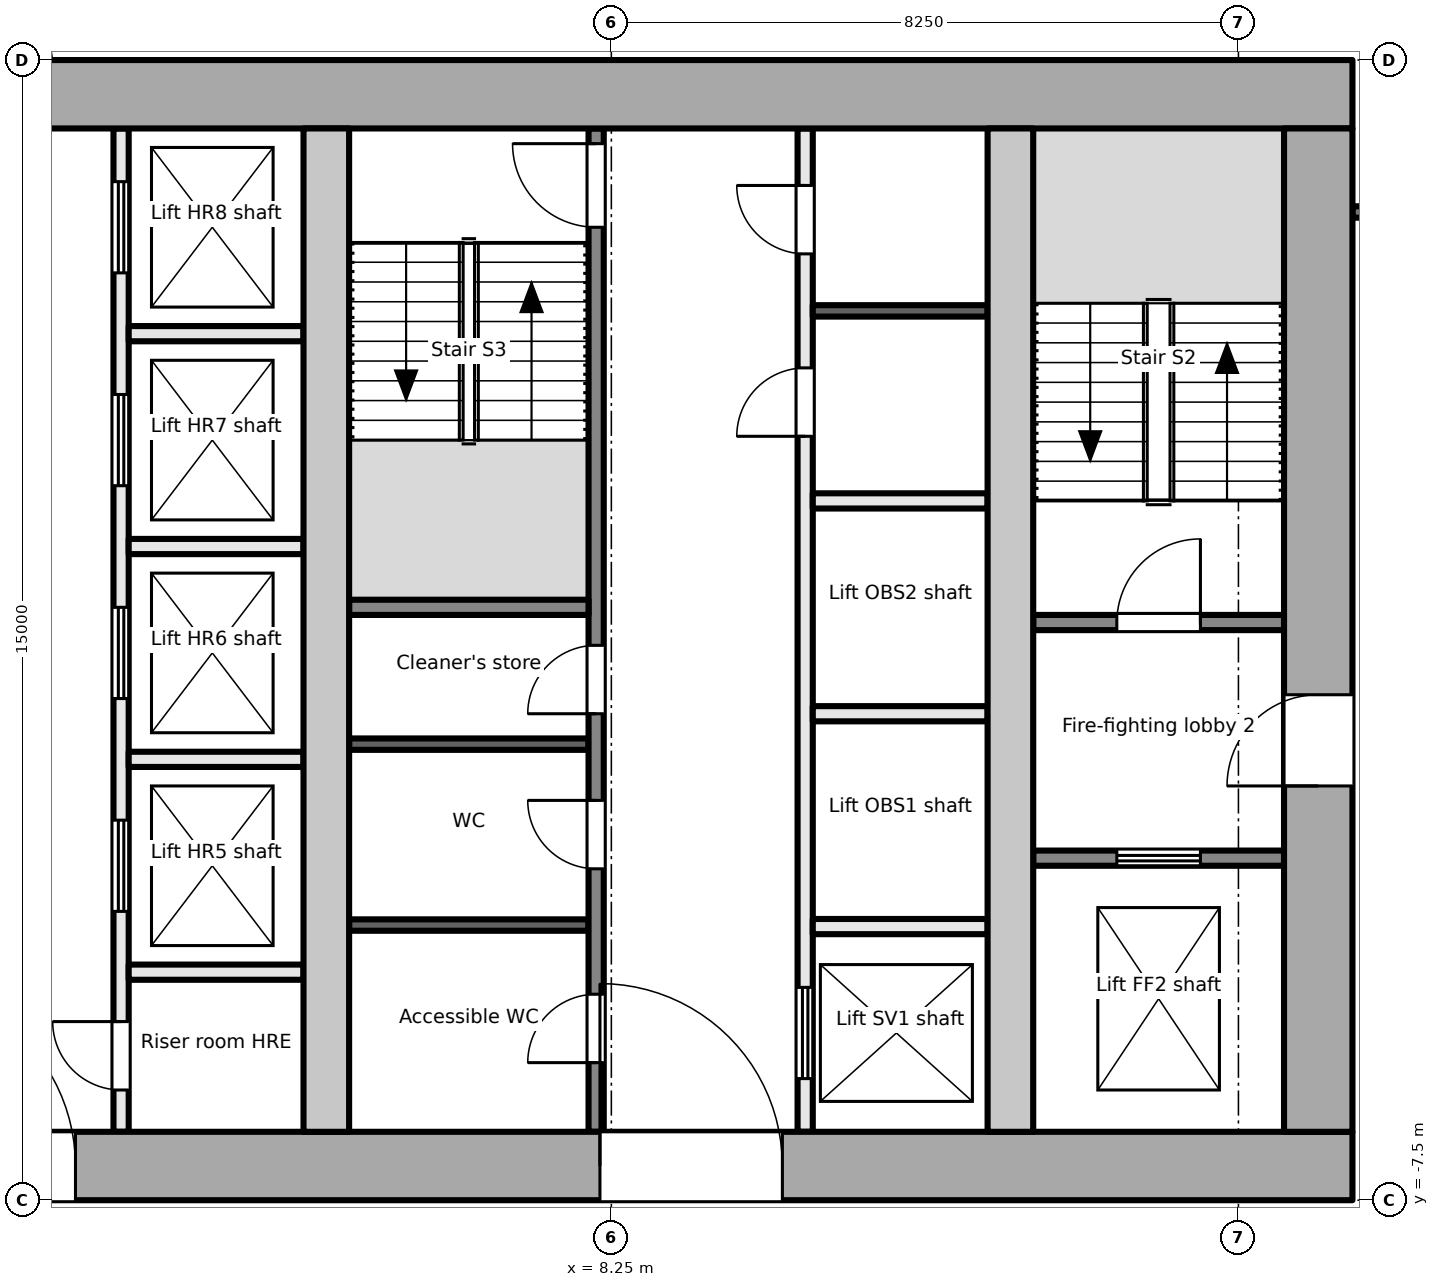
"""IFC4 building model, lengths in metres.
Left out: names, types, materials, properties, quantities, classifications, styles, units other than length and angle.
Written with IfcOpenShell. Run it as: python <this file> out.ifc"""

import sys

from ifc_helpers import new_model, si_unit, direction, frame, frame_2d, origin, place, context, subcontext, project, spatial, rectangle, extrude, element, fill, save


model = new_model("IFC4")
c1 = context("Model", 3, precision=1e-05, world=origin(), true_north=direction((0.0, 1.0)))
c2 = subcontext(c1, "Body", "Model", "MODEL_VIEW")
j1 = project(units=[si_unit("LENGTHUNIT", "METRE"), si_unit("PLANEANGLEUNIT", "RADIAN")], contexts=[c1])
p1 = place(None, origin())
s1 = spatial("IfcSite", under=j1, at=p1, CompositionType="ELEMENT")
p2 = place(p1, origin())
s2 = spatial("IfcBuilding", under=s1, at=p2, CompositionType="ELEMENT")
p3 = place(p2, frame((0.0, 0.0, 172.4)))
s3 = spatial("IfcBuildingStorey", under=s2, at=p3, CompositionType="ELEMENT", Elevation=172.4)
p4 = place(p3, frame((-18.0, -7.05, -0.2), z_axis=(0.0, 0.0, 1.0), x_axis=(1.0, 0.0, 0.0)))
e1 = element("IfcWall", 1, at=p4, inside=s3, PredefinedType="SHEAR", context=c2, shape_type="SweptSolid", body=[
    extrude(rectangle(XDim=36.0, YDim=0.9, at=frame_2d((18.0, 0.0))), origin(), (0.0, 0.0, 1.0), 3.9),
])
p5 = place(p4, frame((8.1, 0.0, 0.2)))
e2 = element("IfcOpeningElement", 2, at=p5, cuts=e1, PredefinedType="OPENING", context=c2, shape_type="SweptSolid", body=[
    extrude(rectangle(XDim=1.8, YDim=2.1, at=frame_2d((0.9, 1.05))), frame((0.0, 0.46, 0.0), z_axis=(0.0, -1.0, 0.0), x_axis=(1.0, 0.0, 0.0)), (0.0, 0.0, 1.0), 0.921),
])
p6 = place(p4, frame((16.8, 0.0, 0.2)))
e3 = element("IfcOpeningElement", 3, at=p6, cuts=e1, PredefinedType="OPENING", context=c2, shape_type="SweptSolid", body=[
    extrude(rectangle(XDim=2.4, YDim=2.1, at=frame_2d((1.2, 1.05))), frame((0.0, 0.46, 0.0), z_axis=(0.0, -1.0, 0.0), x_axis=(1.0, 0.0, 0.0)), (0.0, 0.0, 1.0), 0.921),
])
p7 = place(p4, frame((26.1, 0.0, 0.2)))
e4 = element("IfcOpeningElement", 4, at=p7, cuts=e1, PredefinedType="OPENING", context=c2, shape_type="SweptSolid", body=[
    extrude(rectangle(XDim=2.4, YDim=2.1, at=frame_2d((1.2, 1.05))), frame((0.0, 0.46, 0.0), z_axis=(0.0, -1.0, 0.0), x_axis=(1.0, 0.0, 0.0)), (0.0, 0.0, 1.0), 0.921),
])
p8 = place(p3, frame((-18.0, 7.05, -0.2), z_axis=(0.0, 0.0, 1.0), x_axis=(1.0, 0.0, 0.0)))
e5 = element("IfcWall", 5, at=p8, inside=s3, PredefinedType="SHEAR", context=c2, shape_type="SweptSolid", body=[
    extrude(rectangle(XDim=36.0, YDim=0.9, at=frame_2d((18.0, 0.0))), origin(), (0.0, 0.0, 1.0), 3.9),
])
p9 = place(p3, frame((17.55, -6.6, -0.2), z_axis=(0.0, 0.0, 1.0), x_axis=(0.0, 1.0, 0.0)))
e6 = element("IfcWall", 6, at=p9, inside=s3, PredefinedType="SHEAR", context=c2, shape_type="SweptSolid", body=[
    extrude(rectangle(XDim=13.2, YDim=0.9, at=frame_2d((6.6, 0.0))), origin(), (0.0, 0.0, 1.0), 3.9),
])
p10 = place(p9, frame((4.55, 0.0, 0.2)))
e7 = element("IfcOpeningElement", 7, at=p10, cuts=e6, PredefinedType="OPENING", context=c2, shape_type="SweptSolid", body=[
    extrude(rectangle(XDim=1.2, YDim=2.1, at=frame_2d((0.6, 1.05))), frame((0.0, 0.46, 0.0), z_axis=(0.0, -1.0, 0.0), x_axis=(1.0, 0.0, 0.0)), (0.0, 0.0, 1.0), 0.921),
])
for number, where, z_axis, x_axis in (
    (8, (4.5, -6.6, -0.2), (0.0, 0.0, 1.0), (0.0, 1.0, 0.0)),
    (9, (13.5, -6.6, -0.2), (0.0, 0.0, 1.0), (0.0, 1.0, 0.0)),
):
    element("IfcWall", number, at=place(p3, frame(where, z_axis=z_axis, x_axis=x_axis)), inside=s3, PredefinedType="SHEAR", context=c2, shape_type="SweptSolid", body=[
        extrude(rectangle(XDim=13.2, YDim=0.6, at=frame_2d((6.6, 0.0))), origin(), (0.0, 0.0, 1.0), 3.9),
    ])
p11 = place(p3, frame((13.8, -3.0, 0.0), z_axis=(0.0, 0.0, 1.0), x_axis=(1.0, 0.0, 0.0)))
e10 = element("IfcWall", 10, at=p11, inside=s3, PredefinedType="PARTITIONING", context=c2, shape_type="SweptSolid", body=[
    extrude(rectangle(XDim=3.3, YDim=0.2, at=frame_2d((1.65, 0.0))), origin(), (0.0, 0.0, 1.0), 3.7),
])
p12 = place(p11, frame((1.1, 0.0, 0.0)))
e11 = element("IfcOpeningElement", 11, at=p12, cuts=e10, PredefinedType="OPENING", context=c2, shape_type="SweptSolid", body=[
    extrude(rectangle(XDim=1.1, YDim=2.1, at=frame_2d((0.55, 1.05))), frame((0.0, 0.111, 0.0), z_axis=(0.0, -1.0, 0.0), x_axis=(1.0, 0.0, 0.0)), (0.0, 0.0, 1.0), 0.221),
])
p13 = place(p3, frame((13.8, 0.1, 0.0), z_axis=(0.0, 0.0, 1.0), x_axis=(1.0, 0.0, 0.0)))
e12 = element("IfcWall", 12, at=p13, inside=s3, PredefinedType="PARTITIONING", context=c2, shape_type="SweptSolid", body=[
    extrude(rectangle(XDim=3.3, YDim=0.2, at=frame_2d((1.65, 0.0))), origin(), (0.0, 0.0, 1.0), 3.7),
])
p14 = place(p13, frame((1.1, 0.0, 0.0)))
e13 = element("IfcOpeningElement", 13, at=p14, cuts=e12, PredefinedType="OPENING", context=c2, shape_type="SweptSolid", body=[
    extrude(rectangle(XDim=1.1, YDim=2.1, at=frame_2d((0.55, 1.05))), frame((0.0, 0.111, 0.0), z_axis=(0.0, -1.0, 0.0), x_axis=(1.0, 0.0, 0.0)), (0.0, 0.0, 1.0), 0.221),
])
p15 = place(p3, frame((1.8, -6.6, 0.0), z_axis=(0.0, 0.0, 1.0), x_axis=(0.0, 1.0, 0.0)))
e14 = element("IfcWall", 14, at=p15, inside=s3, PredefinedType="PARTITIONING", context=c2, shape_type="SweptSolid", body=[
    extrude(rectangle(XDim=13.2, YDim=0.2, at=frame_2d((6.6, 0.0))), origin(), (0.0, 0.0, 1.0), 3.7),
])
p16 = place(p15, frame((0.55, 0.0, 0.0)))
e15 = element("IfcOpeningElement", 15, at=p16, cuts=e14, PredefinedType="OPENING", context=c2, shape_type="SweptSolid", body=[
    extrude(rectangle(XDim=0.9, YDim=2.1, at=frame_2d((0.45, 1.05))), frame((0.0, 0.111, 0.0), z_axis=(0.0, -1.0, 0.0), x_axis=(1.0, 0.0, 0.0)), (0.0, 0.0, 1.0), 0.221),
])
p17 = place(p15, frame((2.9, 0.0, 0.0)))
e16 = element("IfcOpeningElement", 16, at=p17, cuts=e14, PredefinedType="OPENING", context=c2, shape_type="SweptSolid", body=[
    extrude(rectangle(XDim=1.2, YDim=2.1, at=frame_2d((0.6, 1.05))), frame((0.0, 0.111, 0.0), z_axis=(0.0, -1.0, 0.0), x_axis=(1.0, 0.0, 0.0)), (0.0, 0.0, 1.0), 0.221),
])
p18 = place(p15, frame((5.7, 0.0, 0.0)))
e17 = element("IfcOpeningElement", 17, at=p18, cuts=e14, PredefinedType="OPENING", context=c2, shape_type="SweptSolid", body=[
    extrude(rectangle(XDim=1.2, YDim=2.1, at=frame_2d((0.6, 1.05))), frame((0.0, 0.111, 0.0), z_axis=(0.0, -1.0, 0.0), x_axis=(1.0, 0.0, 0.0)), (0.0, 0.0, 1.0), 0.221),
])
p19 = place(p15, frame((8.5, 0.0, 0.0)))
e18 = element("IfcOpeningElement", 18, at=p19, cuts=e14, PredefinedType="OPENING", context=c2, shape_type="SweptSolid", body=[
    extrude(rectangle(XDim=1.2, YDim=2.1, at=frame_2d((0.6, 1.05))), frame((0.0, 0.111, 0.0), z_axis=(0.0, -1.0, 0.0), x_axis=(1.0, 0.0, 0.0)), (0.0, 0.0, 1.0), 0.221),
])
p20 = place(p15, frame((11.3, 0.0, 0.0)))
e19 = element("IfcOpeningElement", 19, at=p20, cuts=e14, PredefinedType="OPENING", context=c2, shape_type="SweptSolid", body=[
    extrude(rectangle(XDim=1.2, YDim=2.1, at=frame_2d((0.6, 1.05))), frame((0.0, 0.111, 0.0), z_axis=(0.0, -1.0, 0.0), x_axis=(1.0, 0.0, 0.0)), (0.0, 0.0, 1.0), 0.221),
])
for number, where, z_axis, x_axis in (
    (20, (1.9, -1.7, 0.0), (0.0, 0.0, 1.0), (1.0, 0.0, 0.0)),
    (21, (1.9, 1.1, 0.0), (0.0, 0.0, 1.0), (1.0, 0.0, 0.0)),
    (22, (1.9, 3.9, 0.0), (0.0, 0.0, 1.0), (1.0, 0.0, 0.0)),
    (23, (1.9, -4.5, 0.0), (0.0, 0.0, 1.0), (1.0, 0.0, 0.0)),
):
    element("IfcWall", number, at=place(p3, frame(where, z_axis=z_axis, x_axis=x_axis)), inside=s3, PredefinedType="PARTITIONING", context=c2, shape_type="SweptSolid", body=[
        extrude(rectangle(XDim=2.3, YDim=0.2, at=frame_2d((1.15, 0.0))), origin(), (0.0, 0.0, 1.0), 3.7),
    ])
p21 = place(p3, frame((8.05, -6.6, 0.0), z_axis=(0.0, 0.0, 1.0), x_axis=(0.0, 1.0, 0.0)))
e24 = element("IfcWall", 24, at=p21, inside=s3, PredefinedType="PARTITIONING", context=c2, shape_type="SweptSolid", body=[
    extrude(rectangle(XDim=13.2, YDim=0.2, at=frame_2d((6.6, 0.0))), origin(), (0.0, 0.0, 1.0), 3.7),
])
p22 = place(p21, frame((0.91, 0.0, 0.0)))
e25 = element("IfcOpeningElement", 25, at=p22, cuts=e24, PredefinedType="OPENING", context=c2, shape_type="SweptSolid", body=[
    extrude(rectangle(XDim=0.9, YDim=2.1, at=frame_2d((0.45, 1.05))), frame((0.0, 0.111, 0.0), z_axis=(0.0, -1.0, 0.0), x_axis=(1.0, 0.0, 0.0)), (0.0, 0.0, 1.0), 0.221),
])
p23 = place(p21, frame((3.46, 0.0, 0.0)))
e26 = element("IfcOpeningElement", 26, at=p23, cuts=e24, PredefinedType="OPENING", context=c2, shape_type="SweptSolid", body=[
    extrude(rectangle(XDim=0.9, YDim=2.1, at=frame_2d((0.45, 1.05))), frame((0.0, 0.111, 0.0), z_axis=(0.0, -1.0, 0.0), x_axis=(1.0, 0.0, 0.0)), (0.0, 0.0, 1.0), 0.221),
])
p24 = place(p21, frame((5.5, 0.0, 0.0)))
e27 = element("IfcOpeningElement", 27, at=p24, cuts=e24, PredefinedType="OPENING", context=c2, shape_type="SweptSolid", body=[
    extrude(rectangle(XDim=0.9, YDim=2.1, at=frame_2d((0.45, 1.05))), frame((0.0, 0.111, 0.0), z_axis=(0.0, -1.0, 0.0), x_axis=(1.0, 0.0, 0.0)), (0.0, 0.0, 1.0), 0.221),
])
p25 = place(p21, frame((11.9, 0.0, 0.0)))
e28 = element("IfcOpeningElement", 28, at=p25, cuts=e24, PredefinedType="OPENING", context=c2, shape_type="SweptSolid", body=[
    extrude(rectangle(XDim=1.1, YDim=2.1, at=frame_2d((0.55, 1.05))), frame((0.0, 0.111, 0.0), z_axis=(0.0, -1.0, 0.0), x_axis=(1.0, 0.0, 0.0)), (0.0, 0.0, 1.0), 0.221),
])
p26 = place(p3, frame((10.8, -6.6, 0.0), z_axis=(0.0, 0.0, 1.0), x_axis=(0.0, 1.0, 0.0)))
e29 = element("IfcWall", 29, at=p26, inside=s3, PredefinedType="PARTITIONING", context=c2, shape_type="SweptSolid", body=[
    extrude(rectangle(XDim=13.2, YDim=0.2, at=frame_2d((6.6, 0.0))), origin(), (0.0, 0.0, 1.0), 3.7),
])
p27 = place(p26, frame((0.7, 0.0, 0.0)))
e30 = element("IfcOpeningElement", 30, at=p27, cuts=e29, PredefinedType="OPENING", context=c2, shape_type="SweptSolid", body=[
    extrude(rectangle(XDim=1.2, YDim=2.1, at=frame_2d((0.6, 1.05))), frame((0.0, 0.111, 0.0), z_axis=(0.0, -1.0, 0.0), x_axis=(1.0, 0.0, 0.0)), (0.0, 0.0, 1.0), 0.221),
])
p28 = place(p26, frame((9.15, 0.0, 0.0)))
e31 = element("IfcOpeningElement", 31, at=p28, cuts=e29, PredefinedType="OPENING", context=c2, shape_type="SweptSolid", body=[
    extrude(rectangle(XDim=0.9, YDim=2.1, at=frame_2d((0.45, 1.05))), frame((0.0, 0.111, 0.0), z_axis=(0.0, -1.0, 0.0), x_axis=(1.0, 0.0, 0.0)), (0.0, 0.0, 1.0), 0.221),
])
p29 = place(p26, frame((11.55, 0.0, 0.0)))
e32 = element("IfcOpeningElement", 32, at=p29, cuts=e29, PredefinedType="OPENING", context=c2, shape_type="SweptSolid", body=[
    extrude(rectangle(XDim=0.9, YDim=2.1, at=frame_2d((0.45, 1.05))), frame((0.0, 0.111, 0.0), z_axis=(0.0, -1.0, 0.0), x_axis=(1.0, 0.0, 0.0)), (0.0, 0.0, 1.0), 0.221),
])
p30 = place(p3, frame((4.8, 0.3, 0.0), z_axis=(0.0, 0.0, 1.0), x_axis=(1.0, 0.0, 0.0)))
e33 = element("IfcWall", 33, at=p30, inside=s3, PredefinedType="PARTITIONING", context=c2, shape_type="SweptSolid", body=[
    extrude(rectangle(XDim=3.15, YDim=0.2, at=frame_2d((1.575, 0.0))), origin(), (0.0, 0.0, 1.0), 3.7),
])
for number, where, z_axis, x_axis in (
    (34, (4.8, -3.88, 0.0), (0.0, 0.0, 1.0), (1.0, 0.0, 0.0)),
    (35, (4.8, -1.5, 0.0), (0.0, 0.0, 1.0), (1.0, 0.0, 0.0)),
):
    element("IfcWall", number, at=place(p3, frame(where, z_axis=z_axis, x_axis=x_axis)), inside=s3, PredefinedType="PARTITIONING", context=c2, shape_type="SweptSolid", body=[
        extrude(rectangle(XDim=3.15, YDim=0.15, at=frame_2d((1.575, 0.0))), origin(), (0.0, 0.0, 1.0), 3.7),
    ])
for number, where, z_axis, x_axis in (
    (36, (10.9, -3.9, 0.0), (0.0, 0.0, 1.0), (1.0, 0.0, 0.0)),
    (37, (10.9, -1.1, 0.0), (0.0, 0.0, 1.0), (1.0, 0.0, 0.0)),
    (38, (10.9, 1.7, 0.0), (0.0, 0.0, 1.0), (1.0, 0.0, 0.0)),
):
    element("IfcWall", number, at=place(p3, frame(where, z_axis=z_axis, x_axis=x_axis)), inside=s3, PredefinedType="PARTITIONING", context=c2, shape_type="SweptSolid", body=[
        extrude(rectangle(XDim=2.3, YDim=0.2, at=frame_2d((1.15, 0.0))), origin(), (0.0, 0.0, 1.0), 3.7),
    ])
p31 = place(p3, frame((10.9, 4.2, 0.0), z_axis=(0.0, 0.0, 1.0), x_axis=(1.0, 0.0, 0.0)))
e39 = element("IfcWall", 39, at=p31, inside=s3, PredefinedType="PARTITIONING", context=c2, shape_type="SweptSolid", body=[
    extrude(rectangle(XDim=2.3, YDim=0.15, at=frame_2d((1.15, 0.0))), origin(), (0.0, 0.0, 1.0), 3.7),
])
p32 = place(p3, frame((18.0, 5.501, 0.0), z_axis=(0.0, 0.0, 1.0), x_axis=(1.0, 0.0, 0.0)))
e40 = element("IfcWall", 40, at=p32, inside=s3, PredefinedType="PARTITIONING", context=c2, shape_type="SweptSolid", body=[
    extrude(rectangle(XDim=2.325, YDim=0.15, at=frame_2d((1.163, 0.0))), origin(), (0.0, 0.0, 1.0), 3.7),
])
p33 = place(p32, frame((0.268, 0.0, 0.0)))
e41 = element("IfcOpeningElement", 41, at=p33, cuts=e40, PredefinedType="OPENING", context=c2, shape_type="SweptSolid", body=[
    extrude(rectangle(XDim=1.8, YDim=2.1, at=frame_2d((0.9, 1.05))), frame((0.0, 0.085, 0.0), z_axis=(0.0, -1.0, 0.0), x_axis=(1.0, 0.0, 0.0)), (0.0, 0.0, 1.0), 0.171),
])
p34 = place(p12, origin())
e42 = element("IfcDoor", 42, at=p34, inside=s3, OperationType="DOUBLE_DOOR_SLIDING", PredefinedType="DOOR", context=c2, shape_type="SweptSolid", body=[
    extrude(rectangle(XDim=1.1, YDim=2.1, at=frame_2d((0.55, 1.05))), frame((0.0, 0.025, 0.0), z_axis=(0.0, -1.0, 0.0), x_axis=(1.0, 0.0, 0.0)), (0.0, 0.0, 1.0), 0.05),
])
fill(e11, e42)
p35 = place(p10, origin())
e43 = element("IfcDoor", 43, at=p35, inside=s3, OperationType="SINGLE_SWING_LEFT", PredefinedType="DOOR", context=c2, shape_type="SweptSolid", body=[
    extrude(rectangle(XDim=1.2, YDim=2.1, at=frame_2d((0.6, 1.05))), frame((0.0, 0.025, 0.0), z_axis=(0.0, -1.0, 0.0), x_axis=(1.0, 0.0, 0.0)), (0.0, 0.0, 1.0), 0.05),
])
fill(e7, e43)
p36 = place(p14, origin())
e44 = element("IfcDoor", 44, at=p36, inside=s3, OperationType="SINGLE_SWING_RIGHT", PredefinedType="DOOR", context=c2, shape_type="SweptSolid", body=[
    extrude(rectangle(XDim=1.1, YDim=2.1, at=frame_2d((0.55, 1.05))), frame((0.0, 0.025, 0.0), z_axis=(0.0, -1.0, 0.0), x_axis=(1.0, 0.0, 0.0)), (0.0, 0.0, 1.0), 0.05),
])
fill(e13, e44)
p37 = place(p16, origin())
e45 = element("IfcDoor", 45, at=p37, inside=s3, OperationType="SINGLE_SWING_RIGHT", PredefinedType="DOOR", context=c2, shape_type="SweptSolid", body=[
    extrude(rectangle(XDim=0.9, YDim=2.1, at=frame_2d((0.45, 1.05))), frame((0.0, 0.025, 0.0), z_axis=(0.0, -1.0, 0.0), x_axis=(1.0, 0.0, 0.0)), (0.0, 0.0, 1.0), 0.05),
])
fill(e15, e45)
p38 = place(p17, origin())
e46 = element("IfcDoor", 46, at=p38, inside=s3, OperationType="DOUBLE_DOOR_SLIDING", PredefinedType="DOOR", context=c2, shape_type="SweptSolid", body=[
    extrude(rectangle(XDim=1.2, YDim=2.1, at=frame_2d((0.6, 1.05))), frame((0.0, 0.025, 0.0), z_axis=(0.0, -1.0, 0.0), x_axis=(1.0, 0.0, 0.0)), (0.0, 0.0, 1.0), 0.05),
])
fill(e16, e46)
p39 = place(p18, origin())
e47 = element("IfcDoor", 47, at=p39, inside=s3, OperationType="DOUBLE_DOOR_SLIDING", PredefinedType="DOOR", context=c2, shape_type="SweptSolid", body=[
    extrude(rectangle(XDim=1.2, YDim=2.1, at=frame_2d((0.6, 1.05))), frame((0.0, 0.025, 0.0), z_axis=(0.0, -1.0, 0.0), x_axis=(1.0, 0.0, 0.0)), (0.0, 0.0, 1.0), 0.05),
])
fill(e17, e47)
p40 = place(p19, origin())
e48 = element("IfcDoor", 48, at=p40, inside=s3, OperationType="DOUBLE_DOOR_SLIDING", PredefinedType="DOOR", context=c2, shape_type="SweptSolid", body=[
    extrude(rectangle(XDim=1.2, YDim=2.1, at=frame_2d((0.6, 1.05))), frame((0.0, 0.025, 0.0), z_axis=(0.0, -1.0, 0.0), x_axis=(1.0, 0.0, 0.0)), (0.0, 0.0, 1.0), 0.05),
])
fill(e18, e48)
p41 = place(p20, origin())
e49 = element("IfcDoor", 49, at=p41, inside=s3, OperationType="DOUBLE_DOOR_SLIDING", PredefinedType="DOOR", context=c2, shape_type="SweptSolid", body=[
    extrude(rectangle(XDim=1.2, YDim=2.1, at=frame_2d((0.6, 1.05))), frame((0.0, 0.025, 0.0), z_axis=(0.0, -1.0, 0.0), x_axis=(1.0, 0.0, 0.0)), (0.0, 0.0, 1.0), 0.05),
])
fill(e19, e49)
p42 = place(p6, origin())
e50 = element("IfcDoor", 50, at=p42, inside=s3, OperationType="DOUBLE_DOOR_DOUBLE_SWING", PredefinedType="DOOR", context=c2, shape_type="SweptSolid", body=[
    extrude(rectangle(XDim=2.4, YDim=2.1, at=frame_2d((1.2, 1.05))), frame((0.0, 0.025, 0.0), z_axis=(0.0, -1.0, 0.0), x_axis=(1.0, 0.0, 0.0)), (0.0, 0.0, 1.0), 0.05),
])
fill(e3, e50)
p43 = place(p22, origin())
e51 = element("IfcDoor", 51, at=p43, inside=s3, OperationType="SINGLE_SWING_LEFT", PredefinedType="DOOR", context=c2, shape_type="SweptSolid", body=[
    extrude(rectangle(XDim=0.9, YDim=2.1, at=frame_2d((0.45, 1.05))), frame((0.0, 0.025, 0.0), z_axis=(0.0, -1.0, 0.0), x_axis=(1.0, 0.0, 0.0)), (0.0, 0.0, 1.0), 0.05),
])
fill(e25, e51)
p44 = place(p23, origin())
e52 = element("IfcDoor", 52, at=p44, inside=s3, OperationType="SINGLE_SWING_RIGHT", PredefinedType="DOOR", context=c2, shape_type="SweptSolid", body=[
    extrude(rectangle(XDim=0.9, YDim=2.1, at=frame_2d((0.45, 1.05))), frame((0.0, 0.025, 0.0), z_axis=(0.0, -1.0, 0.0), x_axis=(1.0, 0.0, 0.0)), (0.0, 0.0, 1.0), 0.05),
])
fill(e26, e52)
p45 = place(p24, origin())
e53 = element("IfcDoor", 53, at=p45, inside=s3, OperationType="SINGLE_SWING_LEFT", PredefinedType="DOOR", context=c2, shape_type="SweptSolid", body=[
    extrude(rectangle(XDim=0.9, YDim=2.1, at=frame_2d((0.45, 1.05))), frame((0.0, 0.025, 0.0), z_axis=(0.0, -1.0, 0.0), x_axis=(1.0, 0.0, 0.0)), (0.0, 0.0, 1.0), 0.05),
])
fill(e27, e53)
p46 = place(p25, origin())
e54 = element("IfcDoor", 54, at=p46, inside=s3, OperationType="SINGLE_SWING_RIGHT", PredefinedType="DOOR", context=c2, shape_type="SweptSolid", body=[
    extrude(rectangle(XDim=1.1, YDim=2.1, at=frame_2d((0.55, 1.05))), frame((0.0, 0.025, 0.0), z_axis=(0.0, -1.0, 0.0), x_axis=(1.0, 0.0, 0.0)), (0.0, 0.0, 1.0), 0.05),
])
fill(e28, e54)
p47 = place(p7, origin())
e55 = element("IfcDoor", 55, at=p47, inside=s3, OperationType="DOUBLE_DOOR_DOUBLE_SWING", PredefinedType="DOOR", context=c2, shape_type="SweptSolid", body=[
    extrude(rectangle(XDim=2.4, YDim=2.1, at=frame_2d((1.2, 1.05))), frame((0.0, 0.025, 0.0), z_axis=(0.0, -1.0, 0.0), x_axis=(1.0, 0.0, 0.0)), (0.0, 0.0, 1.0), 0.05),
])
fill(e4, e55)
p48 = place(p27, origin())
e56 = element("IfcDoor", 56, at=p48, inside=s3, OperationType="DOUBLE_DOOR_SLIDING", PredefinedType="DOOR", context=c2, shape_type="SweptSolid", body=[
    extrude(rectangle(XDim=1.2, YDim=2.1, at=frame_2d((0.6, 1.05))), frame((0.0, 0.025, 0.0), z_axis=(0.0, -1.0, 0.0), x_axis=(1.0, 0.0, 0.0)), (0.0, 0.0, 1.0), 0.05),
])
fill(e30, e56)
p49 = place(p28, origin())
e57 = element("IfcDoor", 57, at=p49, inside=s3, OperationType="SINGLE_SWING_LEFT", PredefinedType="DOOR", context=c2, shape_type="SweptSolid", body=[
    extrude(rectangle(XDim=0.9, YDim=2.1, at=frame_2d((0.45, 1.05))), frame((0.0, 0.025, 0.0), z_axis=(0.0, -1.0, 0.0), x_axis=(1.0, 0.0, 0.0)), (0.0, 0.0, 1.0), 0.05),
])
fill(e31, e57)
p50 = place(p29, origin())
e58 = element("IfcDoor", 58, at=p50, inside=s3, OperationType="SINGLE_SWING_RIGHT", PredefinedType="DOOR", context=c2, shape_type="SweptSolid", body=[
    extrude(rectangle(XDim=0.9, YDim=2.1, at=frame_2d((0.45, 1.05))), frame((0.0, 0.025, 0.0), z_axis=(0.0, -1.0, 0.0), x_axis=(1.0, 0.0, 0.0)), (0.0, 0.0, 1.0), 0.05),
])
fill(e32, e58)
save(model, sys.argv[1])
